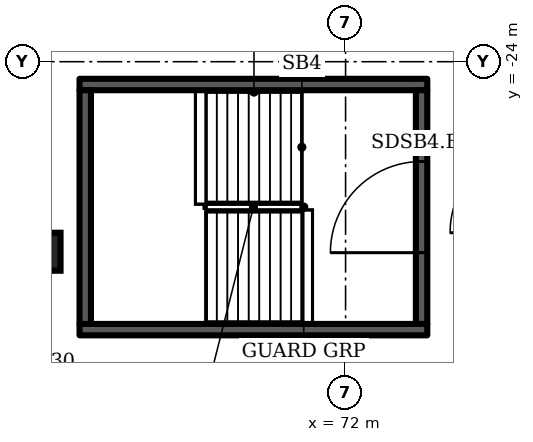
"""IFC4 building model, lengths in metres.
Left out: names, types, materials, properties, quantities, classifications, styles, units other than length and angle.
Written with IfcOpenShell. Run it as: python <this file> out.ifc"""

import sys

from ifc_helpers import new_model, si_unit, direction, frame, frame_2d, origin, origin_2d, place, context, subcontext, project, spatial, rectangle, extrude, element, fill, save


model = new_model("IFC4")
c1 = context("Model", 3, precision=1e-05, world=origin(), true_north=direction((0.0, 1.0)))
c2 = subcontext(c1, "Body", "Model", "MODEL_VIEW")
j1 = project(units=[si_unit("LENGTHUNIT", "METRE"), si_unit("PLANEANGLEUNIT", "RADIAN")], contexts=[c1])
p1 = place(None, origin())
s1 = spatial("IfcSite", under=j1, at=p1, CompositionType="ELEMENT")
p2 = place(p1, origin())
s2 = spatial("IfcBuilding", under=s1, at=p2, CompositionType="ELEMENT")
p3 = place(p2, frame((0.0, 0.0, -7.2)))
s3 = spatial("IfcBuildingStorey", under=s2, at=p3, CompositionType="ELEMENT", Elevation=-7.2)
p4 = place(p3, frame((64.0, -29.0, 0.0), z_axis=(0.0, 0.0, 1.0), x_axis=(1.0, 0.0, 0.0)))
e1 = element("IfcColumn", 1, at=p4, inside=s3, PredefinedType="COLUMN", context=c2, shape_type="SweptSolid", body=[
    extrude(rectangle(XDim=1.0, YDim=1.0, at=origin_2d()), origin(), (0.0, 0.0, 1.0), 7.2),
])
for number, where, z_axis, x_axis in (
    (2, (65.0, -31.05, 0.0), (0.0, 0.0, 1.0), (1.0, 0.0, 0.0)),
    (3, (65.0, -24.6, 0.0), (0.0, 0.0, 1.0), (1.0, 0.0, 0.0)),
):
    element("IfcWall", number, at=place(p3, frame(where, z_axis=z_axis, x_axis=x_axis)), inside=s3, PredefinedType="SHEAR", context=c2, shape_type="SweptSolid", body=[
        extrude(rectangle(XDim=9.15, YDim=0.3, at=frame_2d((4.575, 0.0))), origin(), (0.0, 0.0, 1.0), 6.9),
    ])
p5 = place(p3, frame((65.15, -30.9, 0.0), z_axis=(0.0, 0.0, 1.0), x_axis=(0.0, 1.0, 0.0)))
e4 = element("IfcWall", 4, at=p5, inside=s3, PredefinedType="SHEAR", context=c2, shape_type="SweptSolid", body=[
    extrude(rectangle(XDim=6.15, YDim=0.3, at=frame_2d((3.075, 0.0))), origin(), (0.0, 0.0, 1.0), 6.9),
])
p6 = place(p3, frame((74.0, -30.9, 0.0), z_axis=(0.0, 0.0, 1.0), x_axis=(0.0, 1.0, 0.0)))
e5 = element("IfcWall", 5, at=p6, inside=s3, PredefinedType="SHEAR", context=c2, shape_type="SweptSolid", body=[
    extrude(rectangle(XDim=6.15, YDim=0.3, at=frame_2d((3.075, 0.0))), origin(), (0.0, 0.0, 1.0), 6.9),
])
p7 = place(p6, frame((1.875, 0.0, 0.0)))
e6 = element("IfcOpeningElement", 6, at=p7, cuts=e5, PredefinedType="OPENING", context=c2, shape_type="SweptSolid", body=[
    extrude(rectangle(XDim=2.4, YDim=2.1, at=frame_2d((1.2, 1.05))), frame((0.0, 0.16, 0.0), z_axis=(0.0, -1.0, 0.0), x_axis=(1.0, 0.0, 0.0)), (0.0, 0.0, 1.0), 0.32),
])
p8 = place(p7, origin())
e7 = element("IfcDoor", 7, at=p8, inside=s3, OperationType="DOUBLE_DOOR_SINGLE_SWING", PredefinedType="DOOR", context=c2, shape_type="SweptSolid", body=[
    extrude(rectangle(XDim=2.4, YDim=2.1, at=frame_2d((1.2, 1.05))), frame((0.0, 0.025, 0.0), z_axis=(0.0, -1.0, 0.0), x_axis=(1.0, 0.0, 0.0)), (0.0, 0.0, 1.0), 0.05),
])
fill(e6, e7)
save(model, sys.argv[1])
